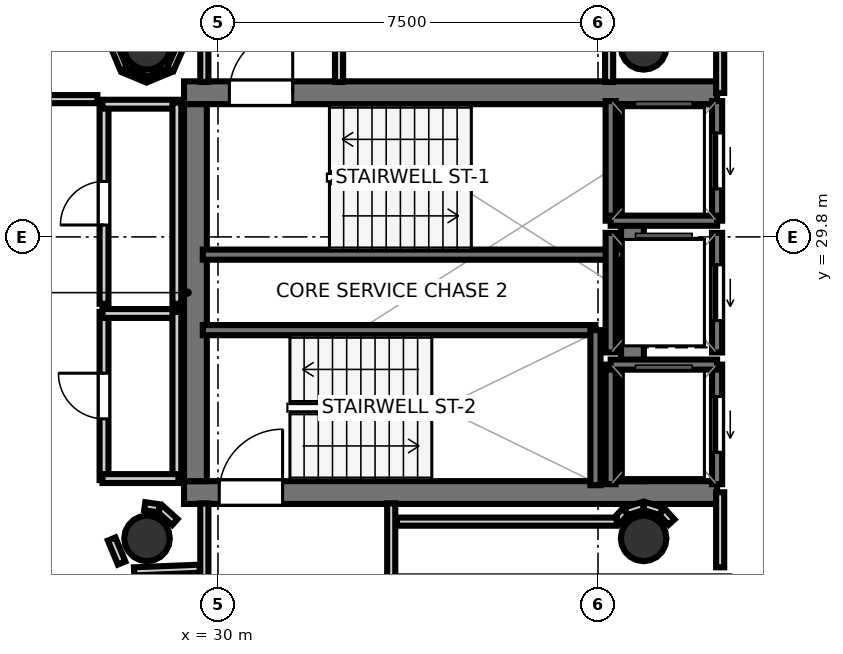
"""IFC4 building model, lengths in metres.
Left out: names, types, materials, properties, quantities, classifications, styles, units other than length and angle.
Written with IfcOpenShell. Run it as: python <this file> out.ifc"""

import sys

from ifc_helpers import new_model, si_unit, direction, frame, frame_2d, origin, origin_2d, place, context, subcontext, project, spatial, rectangle, hollow_circle, extrude, element, fill, save


model = new_model("IFC4")
c1 = context("Model", 3, precision=1e-05, world=origin(), true_north=direction((0.0, 1.0)))
c2 = subcontext(c1, "Body", "Model", "MODEL_VIEW")
j1 = project(units=[si_unit("LENGTHUNIT", "METRE"), si_unit("PLANEANGLEUNIT", "RADIAN")], contexts=[c1])
p1 = place(None, origin())
s1 = spatial("IfcSite", under=j1, at=p1, CompositionType="ELEMENT")
p2 = place(p1, origin())
s2 = spatial("IfcBuilding", under=s1, at=p2, CompositionType="ELEMENT")
p3 = place(p2, frame((0.0, 0.0, 291.7)))
s3 = spatial("IfcBuildingStorey", under=s2, at=p3, CompositionType="ELEMENT", Elevation=291.7)
p4 = place(p3, frame((29.33, 32.645, 0.0), z_axis=(0.0, 0.0, 1.0), x_axis=(1.0, 0.0, 0.0)))
e1 = element("IfcWall", 1, at=p4, inside=s3, PredefinedType="SHEAR", context=c2, shape_type="SweptSolid", body=[
    extrude(rectangle(XDim=10.52, YDim=0.45, at=frame_2d((5.26, 0.0))), origin(), (0.0, 0.0, 1.0), 3.52),
])
p5 = place(p4, frame((0.895, 0.0, 0.0)))
e2 = element("IfcOpeningElement", 2, at=p5, cuts=e1, PredefinedType="OPENING", context=c2, shape_type="SweptSolid", body=[
    extrude(rectangle(XDim=1.25, YDim=2.15, at=frame_2d((0.625, 1.075))), frame((0.0, 0.235, 0.0), z_axis=(0.0, -1.0, 0.0), x_axis=(1.0, 0.0, 0.0)), (0.0, 0.0, 1.0), 0.47),
])
p6 = place(p3, frame((29.33, 24.755, 0.0), z_axis=(0.0, 0.0, 1.0), x_axis=(1.0, 0.0, 0.0)))
e3 = element("IfcWall", 3, at=p6, inside=s3, PredefinedType="SHEAR", context=c2, shape_type="SweptSolid", body=[
    extrude(rectangle(XDim=10.52, YDim=0.45, at=frame_2d((5.26, 0.0))), origin(), (0.0, 0.0, 1.0), 3.52),
])
p7 = place(p6, frame((0.695, 0.0, 0.0)))
e4 = element("IfcOpeningElement", 4, at=p7, cuts=e3, PredefinedType="OPENING", context=c2, shape_type="SweptSolid", body=[
    extrude(rectangle(XDim=1.25, YDim=2.15, at=frame_2d((0.625, 1.075))), frame((0.0, 0.235, 0.0), z_axis=(0.0, -1.0, 0.0), x_axis=(1.0, 0.0, 0.0)), (0.0, 0.0, 1.0), 0.47),
])
for number, where, z_axis, x_axis in (
    (5, (29.555, 24.98, 0.0), (0.0, 0.0, 1.0), (0.0, 1.0, 0.0)),
    (6, (38.18, 24.98, 0.0), (0.0, 0.0, 1.0), (0.0, 1.0, 0.0)),
):
    element("IfcWall", number, at=place(p3, frame(where, z_axis=z_axis, x_axis=x_axis)), inside=s3, PredefinedType="SHEAR", context=c2, shape_type="SweptSolid", body=[
        extrude(rectangle(XDim=7.44, YDim=0.45, at=frame_2d((3.72, 0.0))), origin(), (0.0, 0.0, 1.0), 3.52),
    ])
for number, where, z_axis, x_axis in (
    (7, (28.6, 33.55, 0.0), (0.0, 0.0, 1.0), (1.0, 0.0, 0.0)),
    (8, (28.6, 23.85, 0.0), (0.0, 0.0, 1.0), (1.0, 0.0, 0.0)),
    (9, (38.4, 33.55, 0.0), (0.0, 0.0, 1.0), (1.0, 0.0, 0.0)),
    (10, (38.4, 23.85, 0.0), (0.0, 0.0, 1.0), (1.0, 0.0, 0.0)),
):
    element("IfcColumn", number, at=place(p3, frame(where, z_axis=z_axis, x_axis=x_axis)), inside=s3, PredefinedType="COLUMN", context=c2, shape_type="SweptSolid", body=[
        extrude(hollow_circle(Radius=0.45, WallThickness=0.025, at=origin_2d()), origin(), (0.0, 0.0, 1.0), 3.7),
    ])
p8 = place(p3, frame((29.7, 29.45, 0.0), z_axis=(0.0, 0.0, 1.0), x_axis=(1.0, 0.0, 0.0)))
e11 = element("IfcWall", 11, at=p8, inside=s3, PredefinedType="SOLIDWALL", context=c2, shape_type="SweptSolid", body=[
    extrude(rectangle(XDim=8.3, YDim=0.2, at=frame_2d((4.15, 0.0))), origin(), (0.0, 0.0, 1.0), 3.52),
])
p9 = place(p3, frame((29.7, 27.96, 0.0), z_axis=(0.0, 0.0, 1.0), x_axis=(1.0, 0.0, 0.0)))
e12 = element("IfcWall", 12, at=p9, inside=s3, PredefinedType="SOLIDWALL", context=c2, shape_type="SweptSolid", body=[
    extrude(rectangle(XDim=7.75, YDim=0.2, at=frame_2d((3.875, 0.0))), origin(), (0.0, 0.0, 1.0), 3.52),
])
p10 = place(p3, frame((37.45, 24.9, 0.0), z_axis=(0.0, 0.0, 1.0), x_axis=(0.0, 1.0, 0.0)))
e13 = element("IfcWall", 13, at=p10, inside=s3, PredefinedType="SOLIDWALL", context=c2, shape_type="SweptSolid", body=[
    extrude(rectangle(XDim=3.06, YDim=0.2, at=frame_2d((1.53, 0.0))), origin(), (0.0, 0.0, 1.0), 3.52),
])
p11 = place(p3, frame((39.85, 30.12, 0.0), z_axis=(0.0, 0.0, 1.0), x_axis=(0.0, 1.0, 0.0)))
e14 = element("IfcWall", 14, at=p11, inside=s3, PredefinedType="SOLIDWALL", context=c2, shape_type="SweptSolid", body=[
    extrude(rectangle(XDim=2.36, YDim=0.2, at=frame_2d((1.18, 0.0))), origin(), (0.0, 0.0, 1.0), 3.52),
])
p12 = place(p11, frame((0.63, 0.0, 0.0)))
e15 = element("IfcOpeningElement", 15, at=p12, cuts=e14, PredefinedType="OPENING", context=c2, shape_type="SweptSolid", body=[
    extrude(rectangle(XDim=1.1, YDim=2.15, at=frame_2d((0.55, 1.075))), frame((0.0, 0.11, 0.0), z_axis=(0.0, -1.0, 0.0), x_axis=(1.0, 0.0, 0.0)), (0.0, 0.0, 1.0), 0.22),
])
p13 = place(p3, frame((37.75, 30.12, 0.0), z_axis=(0.0, 0.0, 1.0), x_axis=(0.0, 1.0, 0.0)))
e16 = element("IfcWall", 16, at=p13, inside=s3, PredefinedType="SOLIDWALL", context=c2, shape_type="SweptSolid", body=[
    extrude(rectangle(XDim=2.36, YDim=0.2, at=frame_2d((1.18, 0.0))), origin(), (0.0, 0.0, 1.0), 3.52),
])
p14 = place(p3, frame((37.75, 30.12, 0.0), z_axis=(0.0, 0.0, 1.0), x_axis=(1.0, 0.0, 0.0)))
e17 = element("IfcWall", 17, at=p14, inside=s3, PredefinedType="SOLIDWALL", context=c2, shape_type="SweptSolid", body=[
    extrude(rectangle(XDim=2.1, YDim=0.2, at=frame_2d((1.05, 0.0))), origin(), (0.0, 0.0, 1.0), 3.52),
])
p15 = place(p3, frame((39.85, 24.92, 0.0), z_axis=(0.0, 0.0, 1.0), x_axis=(0.0, 1.0, 0.0)))
e18 = element("IfcWall", 18, at=p15, inside=s3, PredefinedType="SOLIDWALL", context=c2, shape_type="SweptSolid", body=[
    extrude(rectangle(XDim=2.36, YDim=0.2, at=frame_2d((1.18, 0.0))), origin(), (0.0, 0.0, 1.0), 3.52),
])
p16 = place(p15, frame((0.63, 0.0, 0.0)))
e19 = element("IfcOpeningElement", 19, at=p16, cuts=e18, PredefinedType="OPENING", context=c2, shape_type="SweptSolid", body=[
    extrude(rectangle(XDim=1.1, YDim=2.15, at=frame_2d((0.55, 1.075))), frame((0.0, 0.11, 0.0), z_axis=(0.0, -1.0, 0.0), x_axis=(1.0, 0.0, 0.0)), (0.0, 0.0, 1.0), 0.22),
])
p17 = place(p3, frame((37.75, 24.92, 0.0), z_axis=(0.0, 0.0, 1.0), x_axis=(0.0, 1.0, 0.0)))
e20 = element("IfcWall", 20, at=p17, inside=s3, PredefinedType="SOLIDWALL", context=c2, shape_type="SweptSolid", body=[
    extrude(rectangle(XDim=2.36, YDim=0.2, at=frame_2d((1.18, 0.0))), origin(), (0.0, 0.0, 1.0), 3.52),
])
p18 = place(p3, frame((37.75, 27.28, 0.0), z_axis=(0.0, 0.0, 1.0), x_axis=(1.0, 0.0, 0.0)))
e21 = element("IfcWall", 21, at=p18, inside=s3, PredefinedType="SOLIDWALL", context=c2, shape_type="SweptSolid", body=[
    extrude(rectangle(XDim=2.1, YDim=0.2, at=frame_2d((1.05, 0.0))), origin(), (0.0, 0.0, 1.0), 3.52),
])
p19 = place(p3, frame((39.85, 27.52, 0.0), z_axis=(0.0, 0.0, 1.0), x_axis=(0.0, 1.0, 0.0)))
e22 = element("IfcWall", 22, at=p19, inside=s3, PredefinedType="SOLIDWALL", context=c2, shape_type="SweptSolid", body=[
    extrude(rectangle(XDim=2.36, YDim=0.2, at=frame_2d((1.18, 0.0))), origin(), (0.0, 0.0, 1.0), 3.52),
])
p20 = place(p19, frame((0.63, 0.0, 0.0)))
e23 = element("IfcOpeningElement", 23, at=p20, cuts=e22, PredefinedType="OPENING", context=c2, shape_type="SweptSolid", body=[
    extrude(rectangle(XDim=1.1, YDim=2.15, at=frame_2d((0.55, 1.075))), frame((0.0, 0.11, 0.0), z_axis=(0.0, -1.0, 0.0), x_axis=(1.0, 0.0, 0.0)), (0.0, 0.0, 1.0), 0.22),
])
p21 = place(p3, frame((37.75, 27.52, 0.0), z_axis=(0.0, 0.0, 1.0), x_axis=(0.0, 1.0, 0.0)))
e24 = element("IfcWall", 24, at=p21, inside=s3, PredefinedType="SOLIDWALL", context=c2, shape_type="SweptSolid", body=[
    extrude(rectangle(XDim=2.36, YDim=0.2, at=frame_2d((1.18, 0.0))), origin(), (0.0, 0.0, 1.0), 3.52),
])
p22 = place(p3, frame((29.731, 32.858, 0.0), z_axis=(0.0, 0.0, 1.0), x_axis=(0.0, 1.0, 0.0)))
e25 = element("IfcWall", 25, at=p22, inside=s3, PredefinedType="PARTITIONING", context=c2, shape_type="SweptSolid", body=[
    extrude(rectangle(XDim=3.053, YDim=0.16, at=frame_2d((1.526, 0.0))), origin(), (0.0, 0.0, 1.0), 2.84),
])
p23 = place(p3, frame((32.389, 36.29, 0.0), z_axis=(0.0, 0.0, 1.0), x_axis=(0.0, -1.0, 0.0)))
e26 = element("IfcWall", 26, at=p23, inside=s3, PredefinedType="PARTITIONING", context=c2, shape_type="SweptSolid", body=[
    extrude(rectangle(XDim=3.432, YDim=0.16, at=frame_2d((1.716, 0.0))), origin(), (0.0, 0.0, 1.0), 2.84),
])
for number, where, z_axis, x_axis in (
    (27, (29.731, 21.85, 0.0), (0.0, 0.0, 1.0), (0.0, 1.0, 0.0)),
    (28, (33.419, 24.542, 0.0), (0.0, 0.0, 1.0), (0.0, -1.0, 0.0)),
):
    element("IfcWall", number, at=place(p3, frame(where, z_axis=z_axis, x_axis=x_axis)), inside=s3, PredefinedType="PARTITIONING", context=c2, shape_type="SweptSolid", body=[
        extrude(rectangle(XDim=2.692, YDim=0.16, at=frame_2d((1.346, 0.0))), origin(), (0.0, 0.0, 1.0), 2.84),
    ])
p24 = place(p3, frame((39.911, 23.28, 0.0), z_axis=(0.0, 0.0, 1.0), x_axis=(0.0, 1.0, 0.0)))
e29 = element("IfcWall", 29, at=p24, inside=s3, PredefinedType="PARTITIONING", context=c2, shape_type="SweptSolid", body=[
    extrude(rectangle(XDim=1.48, YDim=0.16, at=frame_2d((0.74, 0.0))), origin(), (0.0, 0.0, 1.0), 2.84),
])
p25 = place(p3, frame((39.911, 32.64, 0.0), z_axis=(0.0, 0.0, 1.0), x_axis=(0.0, 1.0, 0.0)))
e30 = element("IfcWall", 30, at=p25, inside=s3, PredefinedType="PARTITIONING", context=c2, shape_type="SweptSolid", body=[
    extrude(rectangle(XDim=2.88, YDim=0.16, at=frame_2d((1.44, 0.0))), origin(), (0.0, 0.0, 1.0), 2.84),
])
p26 = place(p3, frame((27.751, 25.0, 0.0), z_axis=(0.0, 0.0, 1.0), x_axis=(0.0, 1.0, 0.0)))
e31 = element("IfcWall", 31, at=p26, inside=s3, PredefinedType="PLUMBINGWALL", context=c2, shape_type="SweptSolid", body=[
    extrude(rectangle(XDim=3.32, YDim=0.175, at=frame_2d((1.66, 0.0))), origin(), (0.0, 0.0, 1.0), 2.84),
])
p27 = place(p26, frame((1.21, 0.0, 0.0)))
e32 = element("IfcOpeningElement", 32, at=p27, cuts=e31, PredefinedType="OPENING", context=c2, shape_type="SweptSolid", body=[
    extrude(rectangle(XDim=0.9, YDim=2.1, at=frame_2d((0.45, 1.05))), frame((0.0, 0.097, 0.0), z_axis=(0.0, -1.0, 0.0), x_axis=(1.0, 0.0, 0.0)), (0.0, 0.0, 1.0), 0.195),
])
p28 = place(p3, frame((27.72, 28.289, 0.0), z_axis=(0.0, 0.0, 1.0), x_axis=(1.0, 0.0, 0.0)))
e33 = element("IfcWall", 33, at=p28, inside=s3, PredefinedType="PLUMBINGWALL", context=c2, shape_type="SweptSolid", body=[
    extrude(rectangle(XDim=1.5, YDim=0.175, at=frame_2d((0.75, 0.0))), origin(), (0.0, 0.0, 1.0), 2.84),
])
p29 = place(p3, frame((29.189, 28.32, 0.0), z_axis=(0.0, 0.0, 1.0), x_axis=(0.0, -1.0, 0.0)))
e34 = element("IfcWall", 34, at=p29, inside=s3, PredefinedType="PLUMBINGWALL", context=c2, shape_type="SweptSolid", body=[
    extrude(rectangle(XDim=3.32, YDim=0.175, at=frame_2d((1.66, 0.0))), origin(), (0.0, 0.0, 1.0), 2.84),
])
p30 = place(p3, frame((29.22, 25.031, 0.0), z_axis=(0.0, 0.0, 1.0), x_axis=(-1.0, 0.0, 0.0)))
e35 = element("IfcWall", 35, at=p30, inside=s3, PredefinedType="PLUMBINGWALL", context=c2, shape_type="SweptSolid", body=[
    extrude(rectangle(XDim=1.5, YDim=0.175, at=frame_2d((0.75, 0.0))), origin(), (0.0, 0.0, 1.0), 2.84),
])
p31 = place(p3, frame((27.751, 28.48, 0.0), z_axis=(0.0, 0.0, 1.0), x_axis=(0.0, 1.0, 0.0)))
e36 = element("IfcWall", 36, at=p31, inside=s3, PredefinedType="PLUMBINGWALL", context=c2, shape_type="SweptSolid", body=[
    extrude(rectangle(XDim=3.97, YDim=0.175, at=frame_2d((1.985, 0.0))), origin(), (0.0, 0.0, 1.0), 2.84),
])
p32 = place(p31, frame((1.555, 0.0, 0.0)))
e37 = element("IfcOpeningElement", 37, at=p32, cuts=e36, PredefinedType="OPENING", context=c2, shape_type="SweptSolid", body=[
    extrude(rectangle(XDim=0.86, YDim=2.05, at=frame_2d((0.43, 1.025))), frame((0.0, 0.097, 0.0), z_axis=(0.0, -1.0, 0.0), x_axis=(1.0, 0.0, 0.0)), (0.0, 0.0, 1.0), 0.195),
])
p33 = place(p3, frame((27.72, 32.419, 0.0), z_axis=(0.0, 0.0, 1.0), x_axis=(1.0, 0.0, 0.0)))
e38 = element("IfcWall", 38, at=p33, inside=s3, PredefinedType="PLUMBINGWALL", context=c2, shape_type="SweptSolid", body=[
    extrude(rectangle(XDim=1.5, YDim=0.175, at=frame_2d((0.75, 0.0))), origin(), (0.0, 0.0, 1.0), 2.84),
])
p34 = place(p3, frame((29.189, 32.45, 0.0), z_axis=(0.0, 0.0, 1.0), x_axis=(0.0, -1.0, 0.0)))
e39 = element("IfcWall", 39, at=p34, inside=s3, PredefinedType="PLUMBINGWALL", context=c2, shape_type="SweptSolid", body=[
    extrude(rectangle(XDim=3.97, YDim=0.175, at=frame_2d((1.985, 0.0))), origin(), (0.0, 0.0, 1.0), 2.84),
])
p35 = place(p3, frame((38.951, 24.171, 0.0), z_axis=(0.0, 0.0, 1.0), x_axis=(-0.674186852077, 0.738560822469, 0.0)))
e40 = element("IfcWall", 40, at=p35, inside=s3, PredefinedType="PARTITIONING", context=c2, shape_type="SweptSolid", body=[
    extrude(rectangle(XDim=0.281, YDim=0.16, at=frame_2d((0.14, 0.0))), origin(), (0.0, 0.0, 1.0), 2.84),
])
p36 = place(p3, frame((38.748, 24.387, 0.0), z_axis=(0.0, 0.0, 1.0), x_axis=(-0.956948991291, 0.290256142171, 0.0)))
e41 = element("IfcWall", 41, at=p36, inside=s3, PredefinedType="PARTITIONING", context=c2, shape_type="SweptSolid", body=[
    extrude(rectangle(XDim=0.354, YDim=0.16, at=frame_2d((0.177, 0.0))), origin(), (0.0, 0.0, 1.0), 2.84),
])
p37 = place(p3, frame((38.391, 24.49, 0.0), z_axis=(0.0, 0.0, 1.0), x_axis=(-0.957007018611, -0.290064762301, 0.0)))
e42 = element("IfcWall", 42, at=p37, inside=s3, PredefinedType="PARTITIONING", context=c2, shape_type="SweptSolid", body=[
    extrude(rectangle(XDim=0.354, YDim=0.16, at=frame_2d((0.177, 0.0))), origin(), (0.0, 0.0, 1.0), 2.84),
])
p38 = place(p3, frame((38.038, 24.378, 0.0), z_axis=(0.0, 0.0, 1.0), x_axis=(-0.673658387955, -0.739042878551, 0.0)))
e43 = element("IfcWall", 43, at=p38, inside=s3, PredefinedType="PARTITIONING", context=c2, shape_type="SweptSolid", body=[
    extrude(rectangle(XDim=0.246, YDim=0.16, at=frame_2d((0.123, 0.0))), origin(), (0.0, 0.0, 1.0), 2.84),
])
p39 = place(p3, frame((37.872, 24.181, 0.0), z_axis=(0.0, 0.0, 1.0), x_axis=(-1.0, 0.0, 0.0)))
e44 = element("IfcWall", 44, at=p39, inside=s3, PredefinedType="PARTITIONING", context=c2, shape_type="SweptSolid", body=[
    extrude(rectangle(XDim=4.342, YDim=0.16, at=frame_2d((2.171, 0.0))), origin(), (0.0, 0.0, 1.0), 2.84),
])
p40 = place(p3, frame((29.149, 24.173, 0.0), z_axis=(0.0, 0.0, 1.0), x_axis=(-0.745225165416, 0.666812906917, 0.0)))
e45 = element("IfcWall", 45, at=p40, inside=s3, PredefinedType="PARTITIONING", context=c2, shape_type="SweptSolid", body=[
    extrude(rectangle(XDim=0.396, YDim=0.16, at=frame_2d((0.198, 0.0))), origin(), (0.0, 0.0, 1.0), 2.84),
])
p41 = place(p3, frame((28.838, 24.444, 0.0), z_axis=(0.0, 0.0, 1.0), x_axis=(-0.989449148305, 0.144880581578, 0.0)))
e46 = element("IfcWall", 46, at=p41, inside=s3, PredefinedType="PARTITIONING", context=c2, shape_type="SweptSolid", body=[
    extrude(rectangle(XDim=0.286, YDim=0.16, at=frame_2d((0.143, 0.0))), origin(), (0.0, 0.0, 1.0), 2.84),
])
p42 = place(p3, frame((37.719, 35.5, 0.0), z_axis=(0.0, 0.0, 1.0), x_axis=(0.0, -1.0, 0.0)))
e47 = element("IfcWall", 47, at=p42, inside=s3, PredefinedType="PARTITIONING", context=c2, shape_type="SweptSolid", body=[
    extrude(rectangle(XDim=2.642, YDim=0.16, at=frame_2d((1.321, 0.0))), origin(), (0.0, 0.0, 1.0), 2.84),
])
p43 = place(p3, frame((27.901, 23.838, 0.0), z_axis=(0.0, 0.0, 1.0), x_axis=(0.382856448334, -0.923807847969, 0.0)))
e48 = element("IfcWall", 48, at=p43, inside=s3, PredefinedType="PARTITIONING", context=c2, shape_type="SweptSolid", body=[
    extrude(rectangle(XDim=0.513, YDim=0.16, at=frame_2d((0.256, 0.0))), origin(), (0.0, 0.0, 1.0), 2.84),
])
p44 = place(p3, frame((28.345, 23.2, 0.0), z_axis=(0.0, 0.0, 1.0), x_axis=(0.999216536924, 0.039576664043, 0.0)))
e49 = element("IfcWall", 49, at=p44, inside=s3, PredefinedType="PARTITIONING", context=c2, shape_type="SweptSolid", body=[
    extrude(rectangle(XDim=1.295, YDim=0.16, at=frame_2d((0.648, 0.0))), origin(), (0.0, 0.0, 1.0), 2.84),
])
p45 = place(p3, frame((25.65, 32.519, 0.0), z_axis=(0.0, 0.0, 1.0), x_axis=(1.0, 0.0, 0.0)))
e50 = element("IfcWall", 50, at=p45, inside=s3, PredefinedType="PARTITIONING", context=c2, shape_type="SweptSolid", body=[
    extrude(rectangle(XDim=1.97, YDim=0.16, at=frame_2d((0.985, 0.0))), origin(), (0.0, 0.0, 1.0), 2.84),
])
p46 = place(p3, frame((56.387, 35.955, 0.0), z_axis=(0.0, 0.0, 1.0), x_axis=(-0.547085490545, -0.837076738439, 0.0)))
e51 = element("IfcWall", 51, at=p46, inside=s3, PredefinedType="PARTITIONING", context=c2, shape_type="SweptSolid", body=[
    extrude(rectangle(XDim=34.443, YDim=0.12, at=frame_2d((17.221, 0.0))), origin(), (0.0, 0.0, 1.0), 2.84),
])
p47 = place(p3, frame((27.961, 33.538, 0.0), z_axis=(0.0, 0.0, 1.0), x_axis=(0.382274809242, -0.924048683901, 0.0)))
e52 = element("IfcWall", 52, at=p47, inside=s3, PredefinedType="PARTITIONING", context=c2, shape_type="SweptSolid", body=[
    extrude(rectangle(XDim=0.467, YDim=0.14, at=frame_2d((0.233, 0.0))), origin(), (0.0, 0.0, 1.0), 2.84),
])
p48 = place(p3, frame((28.157, 33.09, 0.0), z_axis=(0.0, 0.0, 1.0), x_axis=(0.923863886655, -0.382721202621, 0.0)))
e53 = element("IfcWall", 53, at=p48, inside=s3, PredefinedType="PARTITIONING", context=c2, shape_type="SweptSolid", body=[
    extrude(rectangle(XDim=0.467, YDim=0.12, at=frame_2d((0.233, 0.0))), origin(), (0.0, 0.0, 1.0), 2.84),
])
p49 = place(p3, frame((28.612, 32.911, 0.0), z_axis=(0.0, 0.0, 1.0), x_axis=(0.923863886655, 0.382721202621, 0.0)))
e54 = element("IfcWall", 54, at=p49, inside=s3, PredefinedType="PARTITIONING", context=c2, shape_type="SweptSolid", body=[
    extrude(rectangle(XDim=0.467, YDim=0.105, at=frame_2d((0.233, 0.0))), origin(), (0.0, 0.0, 1.0), 2.84),
])
p50 = place(p3, frame((29.06, 33.106, 0.0), z_axis=(0.0, 0.0, 1.0), x_axis=(0.400352069216, 0.916361402872, 0.0)))
e55 = element("IfcWall", 55, at=p50, inside=s3, PredefinedType="PARTITIONING", context=c2, shape_type="SweptSolid", body=[
    extrude(rectangle(XDim=0.439, YDim=0.14, at=frame_2d((0.219, 0.0))), origin(), (0.0, 0.0, 1.0), 2.84),
])
p51 = place(p5, origin())
e56 = element("IfcDoor", 56, at=p51, inside=s3, OperationType="SINGLE_SWING_RIGHT", PredefinedType="DOOR", context=c2, shape_type="SweptSolid", body=[
    extrude(rectangle(XDim=1.25, YDim=2.15, at=frame_2d((0.625, 1.075))), frame((0.0, 0.025, 0.0), z_axis=(0.0, -1.0, 0.0), x_axis=(1.0, 0.0, 0.0)), (0.0, 0.0, 1.0), 0.05),
])
fill(e2, e56)
p52 = place(p7, origin())
e57 = element("IfcDoor", 57, at=p52, inside=s3, OperationType="SINGLE_SWING_RIGHT", PredefinedType="DOOR", context=c2, shape_type="SweptSolid", body=[
    extrude(rectangle(XDim=1.25, YDim=2.15, at=frame_2d((0.625, 1.075))), frame((0.0, 0.025, 0.0), z_axis=(0.0, -1.0, 0.0), x_axis=(1.0, 0.0, 0.0)), (0.0, 0.0, 1.0), 0.05),
])
fill(e4, e57)
p53 = place(p12, origin())
e58 = element("IfcDoor", 58, at=p53, inside=s3, OperationType="SLIDING_TO_LEFT", PredefinedType="DOOR", context=c2, shape_type="SweptSolid", body=[
    extrude(rectangle(XDim=1.1, YDim=2.15, at=frame_2d((0.55, 1.075))), frame((0.0, 0.025, 0.0), z_axis=(0.0, -1.0, 0.0), x_axis=(1.0, 0.0, 0.0)), (0.0, 0.0, 1.0), 0.05),
])
fill(e15, e58)
p54 = place(p16, origin())
e59 = element("IfcDoor", 59, at=p54, inside=s3, OperationType="SLIDING_TO_LEFT", PredefinedType="DOOR", context=c2, shape_type="SweptSolid", body=[
    extrude(rectangle(XDim=1.1, YDim=2.15, at=frame_2d((0.55, 1.075))), frame((0.0, 0.025, 0.0), z_axis=(0.0, -1.0, 0.0), x_axis=(1.0, 0.0, 0.0)), (0.0, 0.0, 1.0), 0.05),
])
fill(e19, e59)
p55 = place(p20, origin())
e60 = element("IfcDoor", 60, at=p55, inside=s3, OperationType="SLIDING_TO_LEFT", PredefinedType="DOOR", context=c2, shape_type="SweptSolid", body=[
    extrude(rectangle(XDim=1.1, YDim=2.15, at=frame_2d((0.55, 1.075))), frame((0.0, 0.025, 0.0), z_axis=(0.0, -1.0, 0.0), x_axis=(1.0, 0.0, 0.0)), (0.0, 0.0, 1.0), 0.05),
])
fill(e23, e60)
p56 = place(p27, origin())
e61 = element("IfcDoor", 61, at=p56, inside=s3, OperationType="SINGLE_SWING_RIGHT", PredefinedType="DOOR", context=c2, shape_type="SweptSolid", body=[
    extrude(rectangle(XDim=0.9, YDim=2.1, at=frame_2d((0.45, 1.05))), frame((0.0, 0.025, 0.0), z_axis=(0.0, -1.0, 0.0), x_axis=(1.0, 0.0, 0.0)), (0.0, 0.0, 1.0), 0.05),
])
fill(e32, e61)
p57 = place(p32, origin())
e62 = element("IfcDoor", 62, at=p57, inside=s3, OperationType="SINGLE_SWING_LEFT", PredefinedType="DOOR", context=c2, shape_type="SweptSolid", body=[
    extrude(rectangle(XDim=0.86, YDim=2.05, at=frame_2d((0.43, 1.025))), frame((0.0, 0.025, 0.0), z_axis=(0.0, -1.0, 0.0), x_axis=(1.0, 0.0, 0.0)), (0.0, 0.0, 1.0), 0.05),
])
fill(e37, e62)
save(model, sys.argv[1])
